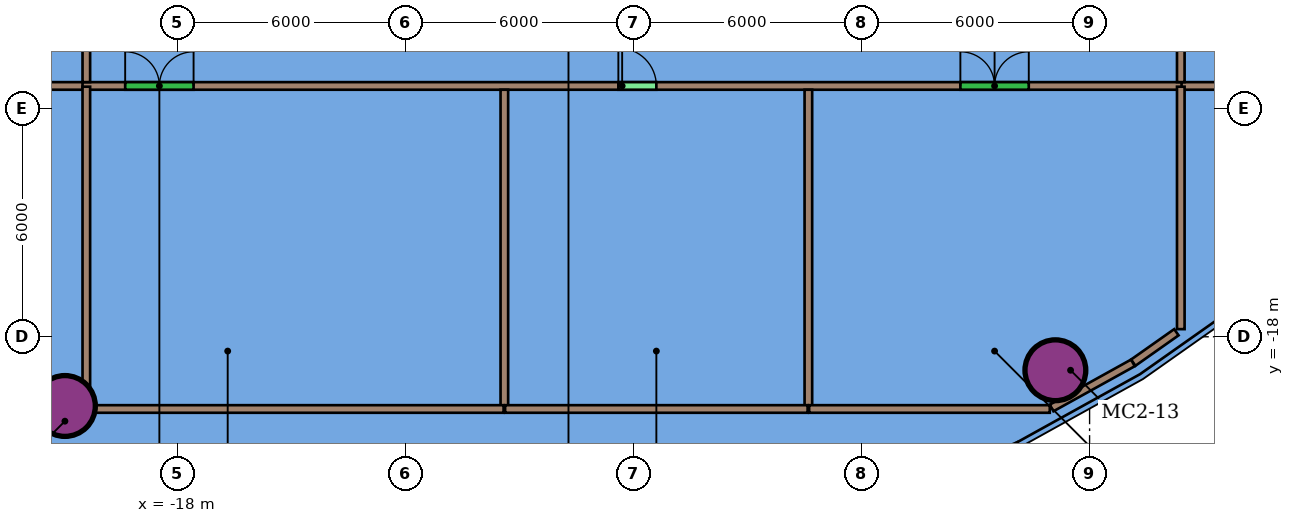
"""IFC4 building model, lengths in metres.
Left out: names, types, materials, properties, quantities, classifications, styles, units other than length and angle.
Written with IfcOpenShell. Run it as: python <this file> out.ifc"""

import sys

from ifc_helpers import new_model, si_unit, direction, frame, frame_2d, origin, origin_2d, place, context, subcontext, project, spatial, rectangle, hollow_circle, extrude, element, fill, save


model = new_model("IFC4")
c1 = context("Model", 3, precision=1e-05, world=origin(), true_north=direction((0.0, 1.0)))
c2 = subcontext(c1, "Body", "Model", "MODEL_VIEW")
j1 = project(units=[si_unit("LENGTHUNIT", "METRE"), si_unit("PLANEANGLEUNIT", "RADIAN")], contexts=[c1])
p1 = place(None, origin())
s1 = spatial("IfcSite", under=j1, at=p1, CompositionType="ELEMENT")
p2 = place(p1, origin())
s2 = spatial("IfcBuilding", under=s1, at=p2, CompositionType="ELEMENT")
p3 = place(p2, frame((0.0, 0.0, 135.4)))
s3 = spatial("IfcBuildingStorey", under=s2, at=p3, CompositionType="ELEMENT", Elevation=135.4)
for number, where, z_axis, x_axis in (
    (1, (-20.963, -19.821, 0.0), (0.0, 0.0, 1.0), (1.0, 0.0, 0.0)),
    (2, (5.1, -18.881, 0.0), (0.0, 0.0, 1.0), (1.0, 0.0, 0.0)),
):
    element("IfcColumn", number, at=place(p3, frame(where, z_axis=z_axis, x_axis=x_axis)), inside=s3, PredefinedType="COLUMN", context=c2, shape_type="SweptSolid", body=[
        extrude(hollow_circle(Radius=0.8, WallThickness=0.055, at=origin_2d()), origin(), (0.0, 0.0, 1.0), 7.85),
    ])
p4 = place(p3, frame((-28.8, -11.4, 0.0), z_axis=(0.0, 0.0, 1.0), x_axis=(1.0, 0.0, 0.0)))
e3 = element("IfcWall", 3, at=p4, inside=s3, PredefinedType="PARTITIONING", context=c2, shape_type="SweptSolid", body=[
    extrude(rectangle(XDim=8.38, YDim=0.2, at=frame_2d((4.19, 0.0))), origin(), (0.0, 0.0, 1.0), 7.262),
])
p5 = place(p3, frame((-20.5, -11.4, 0.0), z_axis=(0.0, 0.0, 1.0), x_axis=(1.0, 0.0, 0.0)))
e4 = element("IfcWall", 4, at=p5, inside=s3, PredefinedType="PARTITIONING", context=c2, shape_type="SweptSolid", body=[
    extrude(rectangle(XDim=29.0, YDim=0.2, at=frame_2d((14.5, 0.0))), origin(), (0.0, 0.0, 1.0), 7.262),
])
p6 = place(p5, frame((1.122, 0.0, 0.0)))
e5 = element("IfcOpeningElement", 5, at=p6, cuts=e4, PredefinedType="OPENING", context=c2, shape_type="SweptSolid", body=[
    extrude(rectangle(XDim=1.8, YDim=2.4, at=frame_2d((0.9, 1.2))), frame((0.0, 0.11, 0.0), z_axis=(0.0, -1.0, 0.0), x_axis=(1.0, 0.0, 0.0)), (0.0, 0.0, 1.0), 0.22),
])
p7 = place(p5, frame((14.1, 0.0, 0.0)))
e6 = element("IfcOpeningElement", 6, at=p7, cuts=e4, PredefinedType="OPENING", context=c2, shape_type="SweptSolid", body=[
    extrude(rectangle(XDim=1.0, YDim=2.1, at=frame_2d((0.5, 1.05))), frame((0.0, 0.11, 0.0), z_axis=(0.0, -1.0, 0.0), x_axis=(1.0, 0.0, 0.0)), (0.0, 0.0, 1.0), 0.22),
])
p8 = place(p5, frame((23.1, 0.0, 0.0)))
e7 = element("IfcOpeningElement", 7, at=p8, cuts=e4, PredefinedType="OPENING", context=c2, shape_type="SweptSolid", body=[
    extrude(rectangle(XDim=1.8, YDim=2.4, at=frame_2d((0.9, 1.2))), frame((0.0, 0.11, 0.0), z_axis=(0.0, -1.0, 0.0), x_axis=(1.0, 0.0, 0.0)), (0.0, 0.0, 1.0), 0.22),
])
p9 = place(p3, frame((8.42, -11.4, 0.0), z_axis=(0.0, 0.0, 1.0), x_axis=(1.0, 0.0, 0.0)))
e8 = element("IfcWall", 8, at=p9, inside=s3, PredefinedType="PARTITIONING", context=c2, shape_type="SweptSolid", body=[
    extrude(rectangle(XDim=6.886, YDim=0.2, at=frame_2d((3.443, 0.0))), origin(), (0.0, 0.0, 1.0), 7.262),
])
p10 = place(p3, frame((8.4, -17.799, 0.0), z_axis=(0.0, 0.0, 1.0), x_axis=(0.0, 1.0, 0.0)))
e9 = element("IfcWall", 9, at=p10, inside=s3, PredefinedType="PARTITIONING", context=c2, shape_type="SweptSolid", body=[
    extrude(rectangle(XDim=6.379, YDim=0.2, at=frame_2d((3.19, 0.0))), origin(), (0.0, 0.0, 1.0), 7.262),
])
p11 = place(p3, frame((8.4, -11.3, 0.0), z_axis=(0.0, 0.0, 1.0), x_axis=(0.0, 1.0, 0.0)))
e10 = element("IfcWall", 10, at=p11, inside=s3, PredefinedType="PARTITIONING", context=c2, shape_type="SweptSolid", body=[
    extrude(rectangle(XDim=22.6, YDim=0.2, at=frame_2d((11.3, 0.0))), origin(), (0.0, 0.0, 1.0), 7.262),
])
p12 = place(p11, frame((10.4, 0.0, 0.0)))
e11 = element("IfcOpeningElement", 11, at=p12, cuts=e10, PredefinedType="OPENING", context=c2, shape_type="SweptSolid", body=[
    extrude(rectangle(XDim=1.8, YDim=2.4, at=frame_2d((0.9, 1.2))), frame((0.0, 0.11, 0.0), z_axis=(0.0, -1.0, 0.0), x_axis=(1.0, 0.0, 0.0)), (0.0, 0.0, 1.0), 0.22),
])
p13 = place(p3, frame((-20.4, -19.8, 0.0), z_axis=(0.0, 0.0, 1.0), x_axis=(0.0, 1.0, 0.0)))
e12 = element("IfcWall", 12, at=p13, inside=s3, PredefinedType="PARTITIONING", context=c2, shape_type="SweptSolid", body=[
    extrude(rectangle(XDim=8.38, YDim=0.2, at=frame_2d((4.19, 0.0))), origin(), (0.0, 0.0, 1.0), 7.262),
])
p14 = place(p3, frame((-20.4, 11.3, 0.0), z_axis=(0.0, 0.0, 1.0), x_axis=(0.0, -1.0, 0.0)))
e13 = element("IfcWall", 13, at=p14, inside=s3, PredefinedType="PARTITIONING", context=c2, shape_type="SweptSolid", body=[
    extrude(rectangle(XDim=22.6, YDim=0.2, at=frame_2d((11.3, 0.0))), origin(), (0.0, 0.0, 1.0), 7.262),
])
p15 = place(p14, frame((15.7, 0.0, 0.0)))
e14 = element("IfcOpeningElement", 14, at=p15, cuts=e13, PredefinedType="OPENING", context=c2, shape_type="SweptSolid", body=[
    extrude(rectangle(XDim=1.8, YDim=2.4, at=frame_2d((0.9, 1.2))), frame((0.0, 0.11, 0.0), z_axis=(0.0, -1.0, 0.0), x_axis=(1.0, 0.0, 0.0)), (0.0, 0.0, 1.0), 0.22),
])
p16 = place(p14, frame((4.374, 0.0, 0.0)))
e15 = element("IfcOpeningElement", 15, at=p16, cuts=e13, PredefinedType="OPENING", context=c2, shape_type="SweptSolid", body=[
    extrude(rectangle(XDim=1.8, YDim=2.4, at=frame_2d((0.9, 1.2))), frame((0.0, 0.11, 0.0), z_axis=(0.0, -1.0, 0.0), x_axis=(1.0, 0.0, 0.0)), (0.0, 0.0, 1.0), 0.22),
])
for number, where, z_axis, x_axis in (
    (16, (-9.4, -19.9, 0.0), (0.0, 0.0, 1.0), (0.0, 1.0, 0.0)),
    (17, (-1.4, -19.9, 0.0), (0.0, 0.0, 1.0), (0.0, 1.0, 0.0)),
):
    element("IfcWall", number, at=place(p3, frame(where, z_axis=z_axis, x_axis=x_axis)), inside=s3, PredefinedType="PARTITIONING", context=c2, shape_type="SweptSolid", body=[
        extrude(rectangle(XDim=8.4, YDim=0.2, at=frame_2d((4.2, 0.0))), origin(), (0.0, 0.0, 1.0), 7.262),
    ])
p17 = place(p3, frame((-20.5, -19.9, 0.0), z_axis=(0.0, 0.0, 1.0), x_axis=(1.0, 0.0, 0.0)))
e18 = element("IfcWall", 18, at=p17, inside=s3, PredefinedType="PARTITIONING", context=c2, shape_type="SweptSolid", body=[
    extrude(rectangle(XDim=11.08, YDim=0.2, at=frame_2d((5.54, 0.0))), origin(), (0.0, 0.0, 1.0), 7.262),
])
p18 = place(p3, frame((-9.38, -19.9, 0.0), z_axis=(0.0, 0.0, 1.0), x_axis=(1.0, 0.0, 0.0)))
e19 = element("IfcWall", 19, at=p18, inside=s3, PredefinedType="PARTITIONING", context=c2, shape_type="SweptSolid", body=[
    extrude(rectangle(XDim=7.96, YDim=0.2, at=frame_2d((3.98, 0.0))), origin(), (0.0, 0.0, 1.0), 7.262),
])
p19 = place(p3, frame((-1.38, -19.9, 0.0), z_axis=(0.0, 0.0, 1.0), x_axis=(1.0, 0.0, 0.0)))
e20 = element("IfcWall", 20, at=p19, inside=s3, PredefinedType="PARTITIONING", context=c2, shape_type="SweptSolid", body=[
    extrude(rectangle(XDim=6.332, YDim=0.2, at=frame_2d((3.166, 0.0))), origin(), (0.0, 0.0, 1.0), 7.262),
])
p20 = place(p3, frame((7.149, -18.681, 0.0), z_axis=(0.0, 0.0, 1.0), x_axis=(0.817328173214, 0.576172419741, 0.0)))
e21 = element("IfcWall", 21, at=p20, inside=s3, PredefinedType="PARTITIONING", context=c2, shape_type="SweptSolid", body=[
    extrude(rectangle(XDim=1.389, YDim=0.2, at=frame_2d((0.694, 0.0))), origin(), (0.0, 0.0, 1.0), 7.262),
])
p21 = place(p3, frame((5.001, -19.873, 0.0), z_axis=(0.0, 0.0, 1.0), x_axis=(0.874698255776, 0.484667887673, 0.0)))
e22 = element("IfcWall", 22, at=p21, inside=s3, PredefinedType="PARTITIONING", context=c2, shape_type="SweptSolid", body=[
    extrude(rectangle(XDim=2.446, YDim=0.2, at=frame_2d((1.223, 0.0))), origin(), (0.0, 0.0, 1.0), 7.262),
])
p22 = place(p6, origin())
e23 = element("IfcDoor", 23, at=p22, inside=s3, OperationType="DOUBLE_DOOR_SINGLE_SWING", PredefinedType="DOOR", context=c2, shape_type="SweptSolid", body=[
    extrude(rectangle(XDim=1.8, YDim=2.4, at=frame_2d((0.9, 1.2))), frame((0.0, 0.025, 0.0), z_axis=(0.0, -1.0, 0.0), x_axis=(1.0, 0.0, 0.0)), (0.0, 0.0, 1.0), 0.05),
])
fill(e5, e23)
p23 = place(p7, origin())
e24 = element("IfcDoor", 24, at=p23, inside=s3, OperationType="SINGLE_SWING_LEFT", PredefinedType="DOOR", context=c2, shape_type="SweptSolid", body=[
    extrude(rectangle(XDim=1.0, YDim=2.1, at=frame_2d((0.5, 1.05))), frame((0.0, 0.025, 0.0), z_axis=(0.0, -1.0, 0.0), x_axis=(1.0, 0.0, 0.0)), (0.0, 0.0, 1.0), 0.05),
])
fill(e6, e24)
p24 = place(p8, origin())
e25 = element("IfcDoor", 25, at=p24, inside=s3, OperationType="DOUBLE_DOOR_SINGLE_SWING", PredefinedType="DOOR", context=c2, shape_type="SweptSolid", body=[
    extrude(rectangle(XDim=1.8, YDim=2.4, at=frame_2d((0.9, 1.2))), frame((0.0, 0.025, 0.0), z_axis=(0.0, -1.0, 0.0), x_axis=(1.0, 0.0, 0.0)), (0.0, 0.0, 1.0), 0.05),
])
fill(e7, e25)
save(model, sys.argv[1])
